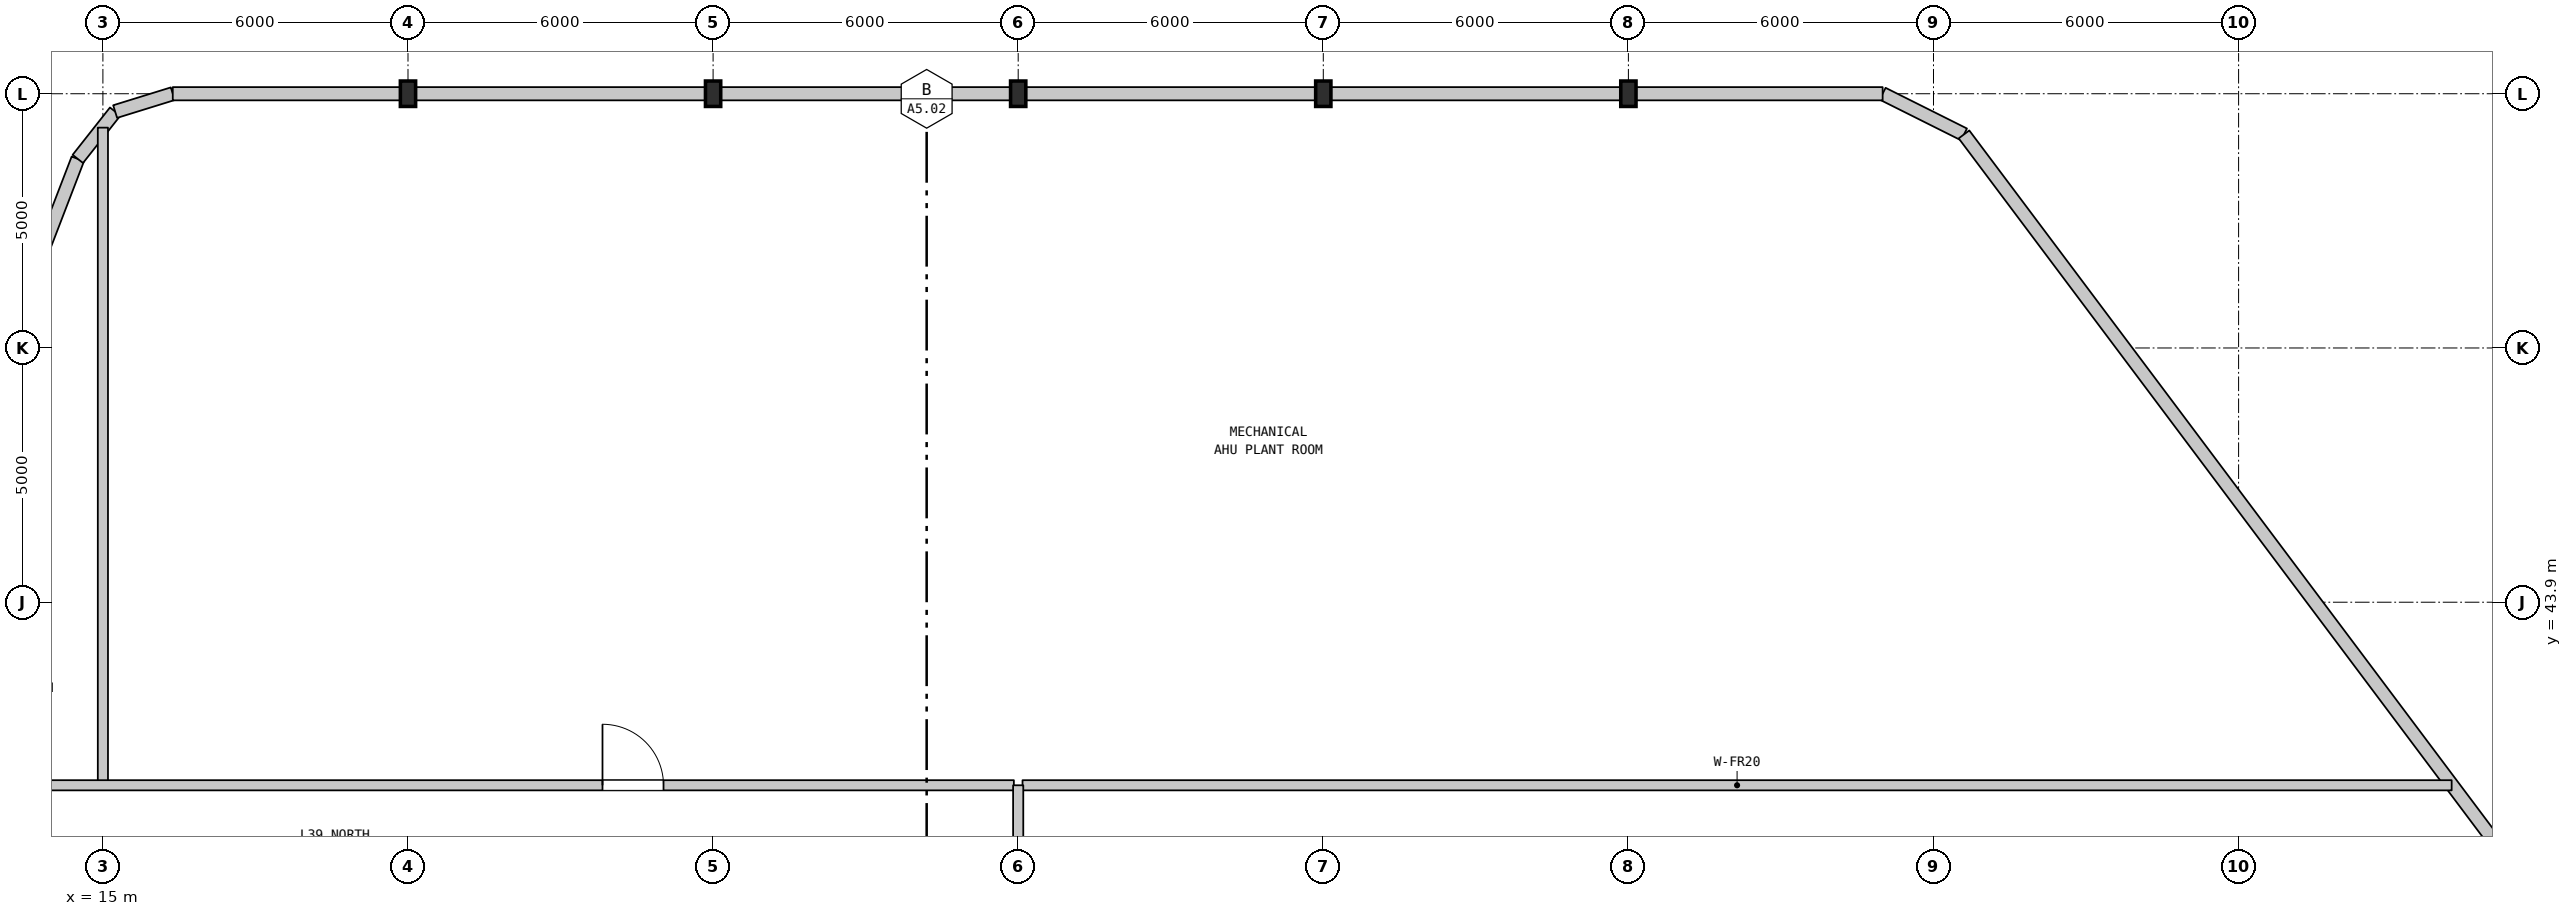
"""IFC4 building model, lengths in metres.
Left out: names, types, materials, properties, quantities, classifications, styles, units other than length and angle.
Written with IfcOpenShell. Run it as: python <this file> out.ifc"""

import sys

from ifc_helpers import new_model, si_unit, direction, frame, frame_2d, origin, origin_2d, place, context, subcontext, project, spatial, rectangle, i_section, extrude, element, fill, save


model = new_model("IFC4")
c1 = context("Model", 3, precision=1e-05, world=origin(), true_north=direction((0.0, 1.0)))
c2 = subcontext(c1, "Body", "Model", "MODEL_VIEW")
j1 = project(units=[si_unit("LENGTHUNIT", "METRE"), si_unit("PLANEANGLEUNIT", "RADIAN")], contexts=[c1])
p1 = place(None, origin())
s1 = spatial("IfcSite", under=j1, at=p1, CompositionType="ELEMENT")
p2 = place(p1, origin())
s2 = spatial("IfcBuilding", under=s1, at=p2, CompositionType="ELEMENT")
p3 = place(p2, frame((0.0, 0.0, 159.4)))
s3 = spatial("IfcBuildingStorey", under=s2, at=p3, CompositionType="ELEMENT", Elevation=159.4)
for number, where, z_axis, x_axis in (
    (1, (21.0, 53.9, 0.0), (0.0, 0.0, 1.0), (1.0, 0.0, 0.0)),
    (2, (27.0, 53.9, 0.0), (0.0, 0.0, 1.0), (1.0, 0.0, 0.0)),
    (3, (33.0, 53.9, 0.0), (0.0, 0.0, 1.0), (1.0, 0.0, 0.0)),
    (4, (39.0, 53.9, 0.0), (0.0, 0.0, 1.0), (1.0, 0.0, 0.0)),
    (5, (45.0, 53.9, 0.0), (0.0, 0.0, 1.0), (1.0, 0.0, 0.0)),
):
    element("IfcColumn", number, at=place(p3, frame(where, z_axis=z_axis, x_axis=x_axis)), inside=s3, PredefinedType="COLUMN", context=c2, shape_type="SweptSolid", body=[
        extrude(i_section(OverallWidth=0.3, OverallDepth=0.5, WebThickness=0.014, FlangeThickness=0.028, FilletRadius=0.027, at=origin_2d()), origin(), (0.0, 0.0, 1.0), 5.2),
    ])
p4 = place(p3, frame((3.497, 23.993, 0.0), z_axis=(0.0, 0.0, 1.0), x_axis=(0.358990281293, 0.93334129767, 0.0)))
e6 = element("IfcWall", 6, at=p4, inside=s3, PredefinedType="STANDARD", context=c2, shape_type="SweptSolid", body=[
    extrude(rectangle(XDim=30.669, YDim=0.26, at=frame_2d((15.335, 0.0))), origin(), (0.0, 0.0, 1.0), 4.89),
])
p5 = place(p3, frame((14.507, 52.618, 0.0), z_axis=(0.0, 0.0, 1.0), x_axis=(0.619003121736, 0.78538852505, 0.0)))
e7 = element("IfcWall", 7, at=p5, inside=s3, PredefinedType="STANDARD", context=c2, shape_type="SweptSolid", body=[
    extrude(rectangle(XDim=1.186, YDim=0.26, at=frame_2d((0.593, 0.0))), origin(), (0.0, 0.0, 1.0), 4.89),
])
p6 = place(p3, frame((15.241, 53.549, 0.0), z_axis=(0.0, 0.0, 1.0), x_axis=(0.955256816454, 0.295777643879, 0.0)))
e8 = element("IfcWall", 8, at=p6, inside=s3, PredefinedType="STANDARD", context=c2, shape_type="SweptSolid", body=[
    extrude(rectangle(XDim=1.186, YDim=0.26, at=frame_2d((0.593, 0.0))), origin(), (0.0, 0.0, 1.0), 4.89),
])
p7 = place(p3, frame((16.374, 53.9, 0.0), z_axis=(0.0, 0.0, 1.0), x_axis=(1.0, 0.0, 0.0)))
e9 = element("IfcWall", 9, at=p7, inside=s3, PredefinedType="STANDARD", context=c2, shape_type="SweptSolid", body=[
    extrude(rectangle(XDim=4.626, YDim=0.26, at=frame_2d((2.313, 0.0))), origin(), (0.0, 0.0, 1.0), 4.89),
])
p8 = place(p3, frame((50.0, 53.9, 0.0), z_axis=(0.0, 0.0, 1.0), x_axis=(0.894481775839, -0.447104409162, 0.0)))
e10 = element("IfcWall", 10, at=p8, inside=s3, PredefinedType="STANDARD", context=c2, shape_type="SweptSolid", body=[
    extrude(rectangle(XDim=1.789, YDim=0.26, at=frame_2d((0.895, 0.0))), origin(), (0.0, 0.0, 1.0), 4.89),
])
p9 = place(p3, frame((51.6, 53.1, 0.0), z_axis=(0.0, 0.0, 1.0), x_axis=(0.6, -0.8, 0.0)))
e11 = element("IfcWall", 11, at=p9, inside=s3, PredefinedType="STANDARD", context=c2, shape_type="SweptSolid", body=[
    extrude(rectangle(XDim=17.655, YDim=0.26, at=frame_2d((8.828, 0.0))), origin(), (0.0, 0.0, 1.0), 4.89),
])
p10 = place(p3, frame((15.0, 40.3, 0.0), z_axis=(0.0, 0.0, 1.0), x_axis=(0.0, 1.0, 0.0)))
e12 = element("IfcWall", 12, at=p10, inside=s3, PredefinedType="STANDARD", context=c2, shape_type="SweptSolid", body=[
    extrude(rectangle(XDim=12.933, YDim=0.2, at=frame_2d((6.466, 0.0))), origin(), (0.0, 0.0, 1.0), 4.89),
])
p11 = place(p3, frame((12.685, 40.3, 0.0), z_axis=(0.0, 0.0, 1.0), x_axis=(1.0, 0.0, 0.0)))
e13 = element("IfcWall", 13, at=p11, inside=s3, PredefinedType="STANDARD", context=c2, shape_type="SweptSolid", body=[
    extrude(rectangle(XDim=20.23, YDim=0.2, at=frame_2d((10.115, 0.0))), origin(), (0.0, 0.0, 1.0), 4.89),
])
p12 = place(p11, frame((12.14, 0.0, 0.0)))
e14 = element("IfcOpeningElement", 14, at=p12, cuts=e13, PredefinedType="OPENING", context=c2, shape_type="SweptSolid", body=[
    extrude(rectangle(XDim=1.2, YDim=2.2, at=frame_2d((0.6, 1.1))), frame((0.0, 0.11, 0.0), z_axis=(0.0, -1.0, 0.0), x_axis=(1.0, 0.0, 0.0)), (0.0, 0.0, 1.0), 0.22),
])
p13 = place(p3, frame((33.085, 40.3, 0.0), z_axis=(0.0, 0.0, 1.0), x_axis=(1.0, 0.0, 0.0)))
e15 = element("IfcWall", 15, at=p13, inside=s3, PredefinedType="STANDARD", context=c2, shape_type="SweptSolid", body=[
    extrude(rectangle(XDim=28.105, YDim=0.2, at=frame_2d((14.052, 0.0))), origin(), (0.0, 0.0, 1.0), 4.89),
])
p14 = place(p3, frame((21.0, 53.9, 0.0), z_axis=(0.0, 0.0, 1.0), x_axis=(1.0, 0.0, 0.0)))
e16 = element("IfcWall", 16, at=p14, inside=s3, PredefinedType="STANDARD", context=c2, shape_type="SweptSolid", body=[
    extrude(rectangle(XDim=12.0, YDim=0.26, at=frame_2d((6.0, 0.0))), origin(), (0.0, 0.0, 1.0), 4.59),
])
p15 = place(p3, frame((33.0, 53.9, 0.0), z_axis=(0.0, 0.0, 1.0), x_axis=(1.0, 0.0, 0.0)))
e17 = element("IfcWall", 17, at=p15, inside=s3, PredefinedType="STANDARD", context=c2, shape_type="SweptSolid", body=[
    extrude(rectangle(XDim=17.0, YDim=0.26, at=frame_2d((8.5, 0.0))), origin(), (0.0, 0.0, 1.0), 4.89),
])
p16 = place(p3, frame((33.0, 37.9, 0.0), z_axis=(0.0, 0.0, 1.0), x_axis=(0.0, 1.0, 0.0)))
e18 = element("IfcWall", 18, at=p16, inside=s3, PredefinedType="STANDARD", context=c2, shape_type="SweptSolid", body=[
    extrude(rectangle(XDim=2.4, YDim=0.2, at=frame_2d((1.2, 0.0))), origin(), (0.0, 0.0, 1.0), 4.29),
])
p17 = place(p12, origin())
e19 = element("IfcDoor", 19, at=p17, inside=s3, OperationType="SINGLE_SWING_LEFT", PredefinedType="DOOR", context=c2, shape_type="SweptSolid", body=[
    extrude(rectangle(XDim=1.2, YDim=2.2, at=frame_2d((0.6, 1.1))), frame((0.0, 0.025, 0.0), z_axis=(0.0, -1.0, 0.0), x_axis=(1.0, 0.0, 0.0)), (0.0, 0.0, 1.0), 0.05),
])
fill(e14, e19)
save(model, sys.argv[1])
